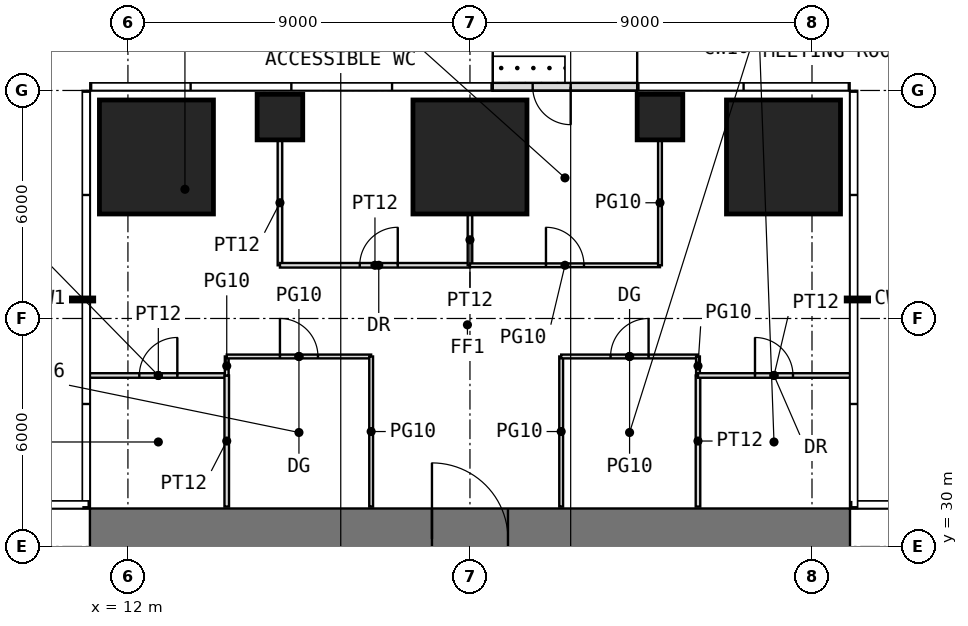
"""IFC4 building model, lengths in metres.
Left out: names, types, materials, properties, quantities, classifications, styles, units other than length and angle.
Written with IfcOpenShell. Run it as: python <this file> out.ifc"""

import sys

from ifc_helpers import new_model, si_unit, direction, frame, frame_2d, origin, origin_2d, place, context, subcontext, project, spatial, rectangle, extrude, element, fill, save


model = new_model("IFC4")
c1 = context("Model", 3, precision=1e-05, world=origin(), true_north=direction((0.0, 1.0)))
c2 = subcontext(c1, "Body", "Model", "MODEL_VIEW")
j1 = project(units=[si_unit("LENGTHUNIT", "METRE"), si_unit("PLANEANGLEUNIT", "RADIAN")], contexts=[c1])
p1 = place(None, origin())
s1 = spatial("IfcSite", under=j1, at=p1, CompositionType="ELEMENT")
p2 = place(p1, origin())
s2 = spatial("IfcBuilding", under=s1, at=p2, CompositionType="ELEMENT")
p3 = place(p2, frame((0.0, 0.0, 112.5)))
s3 = spatial("IfcBuildingStorey", under=s2, at=p3, CompositionType="ELEMENT", Elevation=112.5)
p4 = place(p3, frame((12.75, 40.25, 0.0), z_axis=(0.0, 0.0, 1.0), x_axis=(1.0, 0.0, 0.0)))
e1 = element("IfcColumn", 1, at=p4, inside=s3, PredefinedType="COLUMN", context=c2, shape_type="SweptSolid", body=[
    extrude(rectangle(XDim=3.0, YDim=3.0, at=origin_2d()), origin(), (0.0, 0.0, 1.0), 4.0),
])
p5 = place(p3, frame((16.0, 41.3, 0.0), z_axis=(0.0, 0.0, 1.0), x_axis=(1.0, 0.0, 0.0)))
e2 = element("IfcColumn", 2, at=p5, inside=s3, PredefinedType="COLUMN", context=c2, shape_type="SweptSolid", body=[
    extrude(rectangle(XDim=1.2, YDim=1.2, at=origin_2d()), origin(), (0.0, 0.0, 1.0), 4.0),
])
p6 = place(p3, frame((21.0, 40.25, 0.0), z_axis=(0.0, 0.0, 1.0), x_axis=(1.0, 0.0, 0.0)))
e3 = element("IfcColumn", 3, at=p6, inside=s3, PredefinedType="COLUMN", context=c2, shape_type="SweptSolid", body=[
    extrude(rectangle(XDim=3.0, YDim=3.0, at=origin_2d()), origin(), (0.0, 0.0, 1.0), 4.0),
])
p7 = place(p3, frame((26.0, 41.3, 0.0), z_axis=(0.0, 0.0, 1.0), x_axis=(1.0, 0.0, 0.0)))
e4 = element("IfcColumn", 4, at=p7, inside=s3, PredefinedType="COLUMN", context=c2, shape_type="SweptSolid", body=[
    extrude(rectangle(XDim=1.2, YDim=1.2, at=origin_2d()), origin(), (0.0, 0.0, 1.0), 4.0),
])
p8 = place(p3, frame((29.25, 40.25, 0.0), z_axis=(0.0, 0.0, 1.0), x_axis=(1.0, 0.0, 0.0)))
e5 = element("IfcColumn", 5, at=p8, inside=s3, PredefinedType="COLUMN", context=c2, shape_type="SweptSolid", body=[
    extrude(rectangle(XDim=3.0, YDim=3.0, at=origin_2d()), origin(), (0.0, 0.0, 1.0), 4.0),
])
p9 = place(p3, frame((25.4, 42.1, 0.0), z_axis=(0.0, 0.0, 1.0), x_axis=(-1.0, 0.0, 0.0)))
e6 = element("IfcWall", 6, at=p9, inside=s3, PredefinedType="USERDEFINED", context=c2, shape_type="SweptSolid", body=[
    extrude(rectangle(XDim=3.8, YDim=0.2, at=frame_2d((1.9, 0.0))), origin(), (0.0, 0.0, 1.0), 3.75),
])
p10 = place(p9, frame((1.75, 0.0, 0.0)))
e7 = element("IfcOpeningElement", 7, at=p10, cuts=e6, PredefinedType="OPENING", context=c2, shape_type="SweptSolid", body=[
    extrude(rectangle(XDim=1.0, YDim=2.4, at=frame_2d((0.5, 1.2))), frame((0.0, 0.11, 0.0), z_axis=(0.0, -1.0, 0.0), x_axis=(1.0, 0.0, 0.0)), (0.0, 0.0, 1.0), 0.22),
])
p11 = place(p3, frame((11.0, 30.2, -0.05), z_axis=(0.0, 0.0, 1.0), x_axis=(1.0, 0.0, 0.0)))
e8 = element("IfcWall", 8, at=p11, inside=s3, PredefinedType="SHEAR", context=c2, shape_type="SweptSolid", body=[
    extrude(rectangle(XDim=20.0, YDim=1.6, at=frame_2d((10.0, 0.0))), origin(), (0.0, 0.0, 1.0), 4.0),
])
p12 = place(p11, frame((9.0, 0.0, 0.05)))
e9 = element("IfcOpeningElement", 9, at=p12, cuts=e8, PredefinedType="OPENING", context=c2, shape_type="SweptSolid", body=[
    extrude(rectangle(XDim=2.0, YDim=2.2, at=frame_2d((1.0, 1.1))), frame((0.0, 0.81, 0.0), z_axis=(0.0, -1.0, 0.0), x_axis=(1.0, 0.0, 0.0)), (0.0, 0.0, 1.0), 1.62),
])
p13 = place(p3, frame((11.0, 34.5, 0.0), z_axis=(0.0, 0.0, 1.0), x_axis=(1.0, 0.0, 0.0)))
e10 = element("IfcWall", 10, at=p13, inside=s3, PredefinedType="PARTITIONING", context=c2, shape_type="SweptSolid", body=[
    extrude(rectangle(XDim=3.6, YDim=0.12, at=frame_2d((1.8, 0.0))), origin(), (0.0, 0.0, 1.0), 3.75),
])
p14 = place(p13, frame((1.3, 0.0, 0.0)))
e11 = element("IfcOpeningElement", 11, at=p14, cuts=e10, PredefinedType="OPENING", context=c2, shape_type="SweptSolid", body=[
    extrude(rectangle(XDim=1.0, YDim=2.2, at=frame_2d((0.5, 1.1))), frame((0.0, 0.07, 0.0), z_axis=(0.0, -1.0, 0.0), x_axis=(1.0, 0.0, 0.0)), (0.0, 0.0, 1.0), 0.14),
])
p15 = place(p3, frame((14.6, 31.05, 0.0), z_axis=(0.0, 0.0, 1.0), x_axis=(0.0, 1.0, 0.0)))
e12 = element("IfcWall", 12, at=p15, inside=s3, PredefinedType="PARTITIONING", context=c2, shape_type="SweptSolid", body=[
    extrude(rectangle(XDim=3.45, YDim=0.12, at=frame_2d((1.725, 0.0))), origin(), (0.0, 0.0, 1.0), 3.75),
])
p16 = place(p3, frame((14.6, 34.5, 0.0), z_axis=(0.0, 0.0, 1.0), x_axis=(0.0, 1.0, 0.0)))
e13 = element("IfcWall", 13, at=p16, inside=s3, PredefinedType="PARTITIONING", context=c2, shape_type="SweptSolid", body=[
    extrude(rectangle(XDim=0.5, YDim=0.1, at=frame_2d((0.25, 0.0))), origin(), (0.0, 0.0, 1.0), 3.75),
])
p17 = place(p3, frame((14.6, 35.0, 0.0), z_axis=(0.0, 0.0, 1.0), x_axis=(1.0, 0.0, 0.0)))
e14 = element("IfcWall", 14, at=p17, inside=s3, PredefinedType="PARTITIONING", context=c2, shape_type="SweptSolid", body=[
    extrude(rectangle(XDim=3.8, YDim=0.1, at=frame_2d((1.9, 0.0))), origin(), (0.0, 0.0, 1.0), 3.75),
])
p18 = place(p17, frame((1.4, 0.0, 0.0)))
e15 = element("IfcOpeningElement", 15, at=p18, cuts=e14, PredefinedType="OPENING", context=c2, shape_type="SweptSolid", body=[
    extrude(rectangle(XDim=1.0, YDim=2.4, at=frame_2d((0.5, 1.2))), frame((0.0, 0.06, 0.0), z_axis=(0.0, -1.0, 0.0), x_axis=(1.0, 0.0, 0.0)), (0.0, 0.0, 1.0), 0.12),
])
p19 = place(p3, frame((16.0, 37.4, 0.0), z_axis=(0.0, 0.0, 1.0), x_axis=(0.0, 1.0, 0.0)))
e16 = element("IfcWall", 16, at=p19, inside=s3, PredefinedType="PARTITIONING", context=c2, shape_type="SweptSolid", body=[
    extrude(rectangle(XDim=3.29, YDim=0.12, at=frame_2d((1.645, 0.0))), origin(), (0.0, 0.0, 1.0), 3.75),
])
p20 = place(p3, frame((16.0, 37.4, 0.0), z_axis=(0.0, 0.0, 1.0), x_axis=(1.0, 0.0, 0.0)))
e17 = element("IfcWall", 17, at=p20, inside=s3, PredefinedType="PARTITIONING", context=c2, shape_type="SweptSolid", body=[
    extrude(rectangle(XDim=5.0, YDim=0.12, at=frame_2d((2.5, 0.0))), origin(), (0.0, 0.0, 1.0), 3.75),
])
p21 = place(p20, frame((2.1, 0.0, 0.0)))
e18 = element("IfcOpeningElement", 18, at=p21, cuts=e17, PredefinedType="OPENING", context=c2, shape_type="SweptSolid", body=[
    extrude(rectangle(XDim=1.0, YDim=2.2, at=frame_2d((0.5, 1.1))), frame((0.0, 0.07, 0.0), z_axis=(0.0, -1.0, 0.0), x_axis=(1.0, 0.0, 0.0)), (0.0, 0.0, 1.0), 0.14),
])
p22 = place(p3, frame((18.4, 31.05, 0.0), z_axis=(0.0, 0.0, 1.0), x_axis=(0.0, 1.0, 0.0)))
e19 = element("IfcWall", 19, at=p22, inside=s3, PredefinedType="PARTITIONING", context=c2, shape_type="SweptSolid", body=[
    extrude(rectangle(XDim=3.95, YDim=0.1, at=frame_2d((1.975, 0.0))), origin(), (0.0, 0.0, 1.0), 3.75),
])
p23 = place(p3, frame((21.0, 37.4, 0.0), z_axis=(0.0, 0.0, 1.0), x_axis=(0.0, 1.0, 0.0)))
e20 = element("IfcWall", 20, at=p23, inside=s3, PredefinedType="PARTITIONING", context=c2, shape_type="SweptSolid", body=[
    extrude(rectangle(XDim=1.34, YDim=0.12, at=frame_2d((0.67, 0.0))), origin(), (0.0, 0.0, 1.0), 3.75),
])
p24 = place(p3, frame((21.0, 37.4, 0.0), z_axis=(0.0, 0.0, 1.0), x_axis=(1.0, 0.0, 0.0)))
e21 = element("IfcWall", 21, at=p24, inside=s3, PredefinedType="PARTITIONING", context=c2, shape_type="SweptSolid", body=[
    extrude(rectangle(XDim=5.0, YDim=0.1, at=frame_2d((2.5, 0.0))), origin(), (0.0, 0.0, 1.0), 3.75),
])
p25 = place(p24, frame((2.0, 0.0, 0.0)))
e22 = element("IfcOpeningElement", 22, at=p25, cuts=e21, PredefinedType="OPENING", context=c2, shape_type="SweptSolid", body=[
    extrude(rectangle(XDim=1.0, YDim=2.4, at=frame_2d((0.5, 1.2))), frame((0.0, 0.06, 0.0), z_axis=(0.0, -1.0, 0.0), x_axis=(1.0, 0.0, 0.0)), (0.0, 0.0, 1.0), 0.12),
])
p26 = place(p3, frame((23.4, 31.05, 0.0), z_axis=(0.0, 0.0, 1.0), x_axis=(0.0, 1.0, 0.0)))
e23 = element("IfcWall", 23, at=p26, inside=s3, PredefinedType="PARTITIONING", context=c2, shape_type="SweptSolid", body=[
    extrude(rectangle(XDim=3.95, YDim=0.1, at=frame_2d((1.975, 0.0))), origin(), (0.0, 0.0, 1.0), 3.75),
])
p27 = place(p3, frame((23.4, 35.0, 0.0), z_axis=(0.0, 0.0, 1.0), x_axis=(1.0, 0.0, 0.0)))
e24 = element("IfcWall", 24, at=p27, inside=s3, PredefinedType="PARTITIONING", context=c2, shape_type="SweptSolid", body=[
    extrude(rectangle(XDim=3.6, YDim=0.1, at=frame_2d((1.8, 0.0))), origin(), (0.0, 0.0, 1.0), 3.75),
])
p28 = place(p27, frame((1.3, 0.0, 0.0)))
e25 = element("IfcOpeningElement", 25, at=p28, cuts=e24, PredefinedType="OPENING", context=c2, shape_type="SweptSolid", body=[
    extrude(rectangle(XDim=1.0, YDim=2.4, at=frame_2d((0.5, 1.2))), frame((0.0, 0.06, 0.0), z_axis=(0.0, -1.0, 0.0), x_axis=(1.0, 0.0, 0.0)), (0.0, 0.0, 1.0), 0.12),
])
p29 = place(p3, frame((26.0, 37.4, 0.0), z_axis=(0.0, 0.0, 1.0), x_axis=(0.0, 1.0, 0.0)))
e26 = element("IfcWall", 26, at=p29, inside=s3, PredefinedType="PARTITIONING", context=c2, shape_type="SweptSolid", body=[
    extrude(rectangle(XDim=3.29, YDim=0.1, at=frame_2d((1.645, 0.0))), origin(), (0.0, 0.0, 1.0), 3.75),
])
p30 = place(p3, frame((27.0, 31.05, 0.0), z_axis=(0.0, 0.0, 1.0), x_axis=(0.0, 1.0, 0.0)))
e27 = element("IfcWall", 27, at=p30, inside=s3, PredefinedType="PARTITIONING", context=c2, shape_type="SweptSolid", body=[
    extrude(rectangle(XDim=3.45, YDim=0.12, at=frame_2d((1.725, 0.0))), origin(), (0.0, 0.0, 1.0), 3.75),
])
p31 = place(p3, frame((27.0, 34.5, 0.0), z_axis=(0.0, 0.0, 1.0), x_axis=(0.0, 1.0, 0.0)))
e28 = element("IfcWall", 28, at=p31, inside=s3, PredefinedType="PARTITIONING", context=c2, shape_type="SweptSolid", body=[
    extrude(rectangle(XDim=0.5, YDim=0.1, at=frame_2d((0.25, 0.0))), origin(), (0.0, 0.0, 1.0), 3.75),
])
p32 = place(p3, frame((27.0, 34.5, 0.0), z_axis=(0.0, 0.0, 1.0), x_axis=(1.0, 0.0, 0.0)))
e29 = element("IfcWall", 29, at=p32, inside=s3, PredefinedType="PARTITIONING", context=c2, shape_type="SweptSolid", body=[
    extrude(rectangle(XDim=4.0, YDim=0.12, at=frame_2d((2.0, 0.0))), origin(), (0.0, 0.0, 1.0), 3.75),
])
p33 = place(p32, frame((1.5, 0.0, 0.0)))
e30 = element("IfcOpeningElement", 30, at=p33, cuts=e29, PredefinedType="OPENING", context=c2, shape_type="SweptSolid", body=[
    extrude(rectangle(XDim=1.0, YDim=2.2, at=frame_2d((0.5, 1.1))), frame((0.0, 0.07, 0.0), z_axis=(0.0, -1.0, 0.0), x_axis=(1.0, 0.0, 0.0)), (0.0, 0.0, 1.0), 0.14),
])
p34 = place(p10, origin())
e31 = element("IfcDoor", 31, at=p34, inside=s3, OperationType="SINGLE_SWING_LEFT", PredefinedType="DOOR", context=c2, shape_type="SweptSolid", body=[
    extrude(rectangle(XDim=1.0, YDim=2.4, at=frame_2d((0.5, 1.2))), frame((0.0, 0.025, 0.0), z_axis=(0.0, -1.0, 0.0), x_axis=(1.0, 0.0, 0.0)), (0.0, 0.0, 1.0), 0.05),
])
fill(e7, e31)
p35 = place(p12, origin())
e32 = element("IfcDoor", 32, at=p35, inside=s3, OperationType="DOUBLE_DOOR_SINGLE_SWING", PredefinedType="DOOR", context=c2, shape_type="SweptSolid", body=[
    extrude(rectangle(XDim=2.0, YDim=2.2, at=frame_2d((1.0, 1.1))), frame((0.0, 0.025, 0.0), z_axis=(0.0, -1.0, 0.0), x_axis=(1.0, 0.0, 0.0)), (0.0, 0.0, 1.0), 0.05),
])
fill(e9, e32)
p36 = place(p14, origin())
e33 = element("IfcDoor", 33, at=p36, inside=s3, OperationType="SINGLE_SWING_RIGHT", PredefinedType="DOOR", context=c2, shape_type="SweptSolid", body=[
    extrude(rectangle(XDim=1.0, YDim=2.2, at=frame_2d((0.5, 1.1))), frame((0.0, 0.025, 0.0), z_axis=(0.0, -1.0, 0.0), x_axis=(1.0, 0.0, 0.0)), (0.0, 0.0, 1.0), 0.05),
])
fill(e11, e33)
p37 = place(p18, origin())
e34 = element("IfcDoor", 34, at=p37, inside=s3, OperationType="SINGLE_SWING_LEFT", PredefinedType="DOOR", context=c2, shape_type="SweptSolid", body=[
    extrude(rectangle(XDim=1.0, YDim=2.4, at=frame_2d((0.5, 1.2))), frame((0.0, 0.025, 0.0), z_axis=(0.0, -1.0, 0.0), x_axis=(1.0, 0.0, 0.0)), (0.0, 0.0, 1.0), 0.05),
])
fill(e15, e34)
p38 = place(p28, origin())
e35 = element("IfcDoor", 35, at=p38, inside=s3, OperationType="SINGLE_SWING_RIGHT", PredefinedType="DOOR", context=c2, shape_type="SweptSolid", body=[
    extrude(rectangle(XDim=1.0, YDim=2.4, at=frame_2d((0.5, 1.2))), frame((0.0, 0.025, 0.0), z_axis=(0.0, -1.0, 0.0), x_axis=(1.0, 0.0, 0.0)), (0.0, 0.0, 1.0), 0.05),
])
fill(e25, e35)
p39 = place(p33, origin())
e36 = element("IfcDoor", 36, at=p39, inside=s3, OperationType="SINGLE_SWING_LEFT", PredefinedType="DOOR", context=c2, shape_type="SweptSolid", body=[
    extrude(rectangle(XDim=1.0, YDim=2.2, at=frame_2d((0.5, 1.1))), frame((0.0, 0.025, 0.0), z_axis=(0.0, -1.0, 0.0), x_axis=(1.0, 0.0, 0.0)), (0.0, 0.0, 1.0), 0.05),
])
fill(e30, e36)
p40 = place(p21, origin())
e37 = element("IfcDoor", 37, at=p40, inside=s3, OperationType="SINGLE_SWING_RIGHT", PredefinedType="DOOR", context=c2, shape_type="SweptSolid", body=[
    extrude(rectangle(XDim=1.0, YDim=2.2, at=frame_2d((0.5, 1.1))), frame((0.0, 0.025, 0.0), z_axis=(0.0, -1.0, 0.0), x_axis=(1.0, 0.0, 0.0)), (0.0, 0.0, 1.0), 0.05),
])
fill(e18, e37)
p41 = place(p25, origin())
e38 = element("IfcDoor", 38, at=p41, inside=s3, OperationType="SINGLE_SWING_LEFT", PredefinedType="DOOR", context=c2, shape_type="SweptSolid", body=[
    extrude(rectangle(XDim=1.0, YDim=2.4, at=frame_2d((0.5, 1.2))), frame((0.0, 0.025, 0.0), z_axis=(0.0, -1.0, 0.0), x_axis=(1.0, 0.0, 0.0)), (0.0, 0.0, 1.0), 0.05),
])
fill(e22, e38)
save(model, sys.argv[1])
